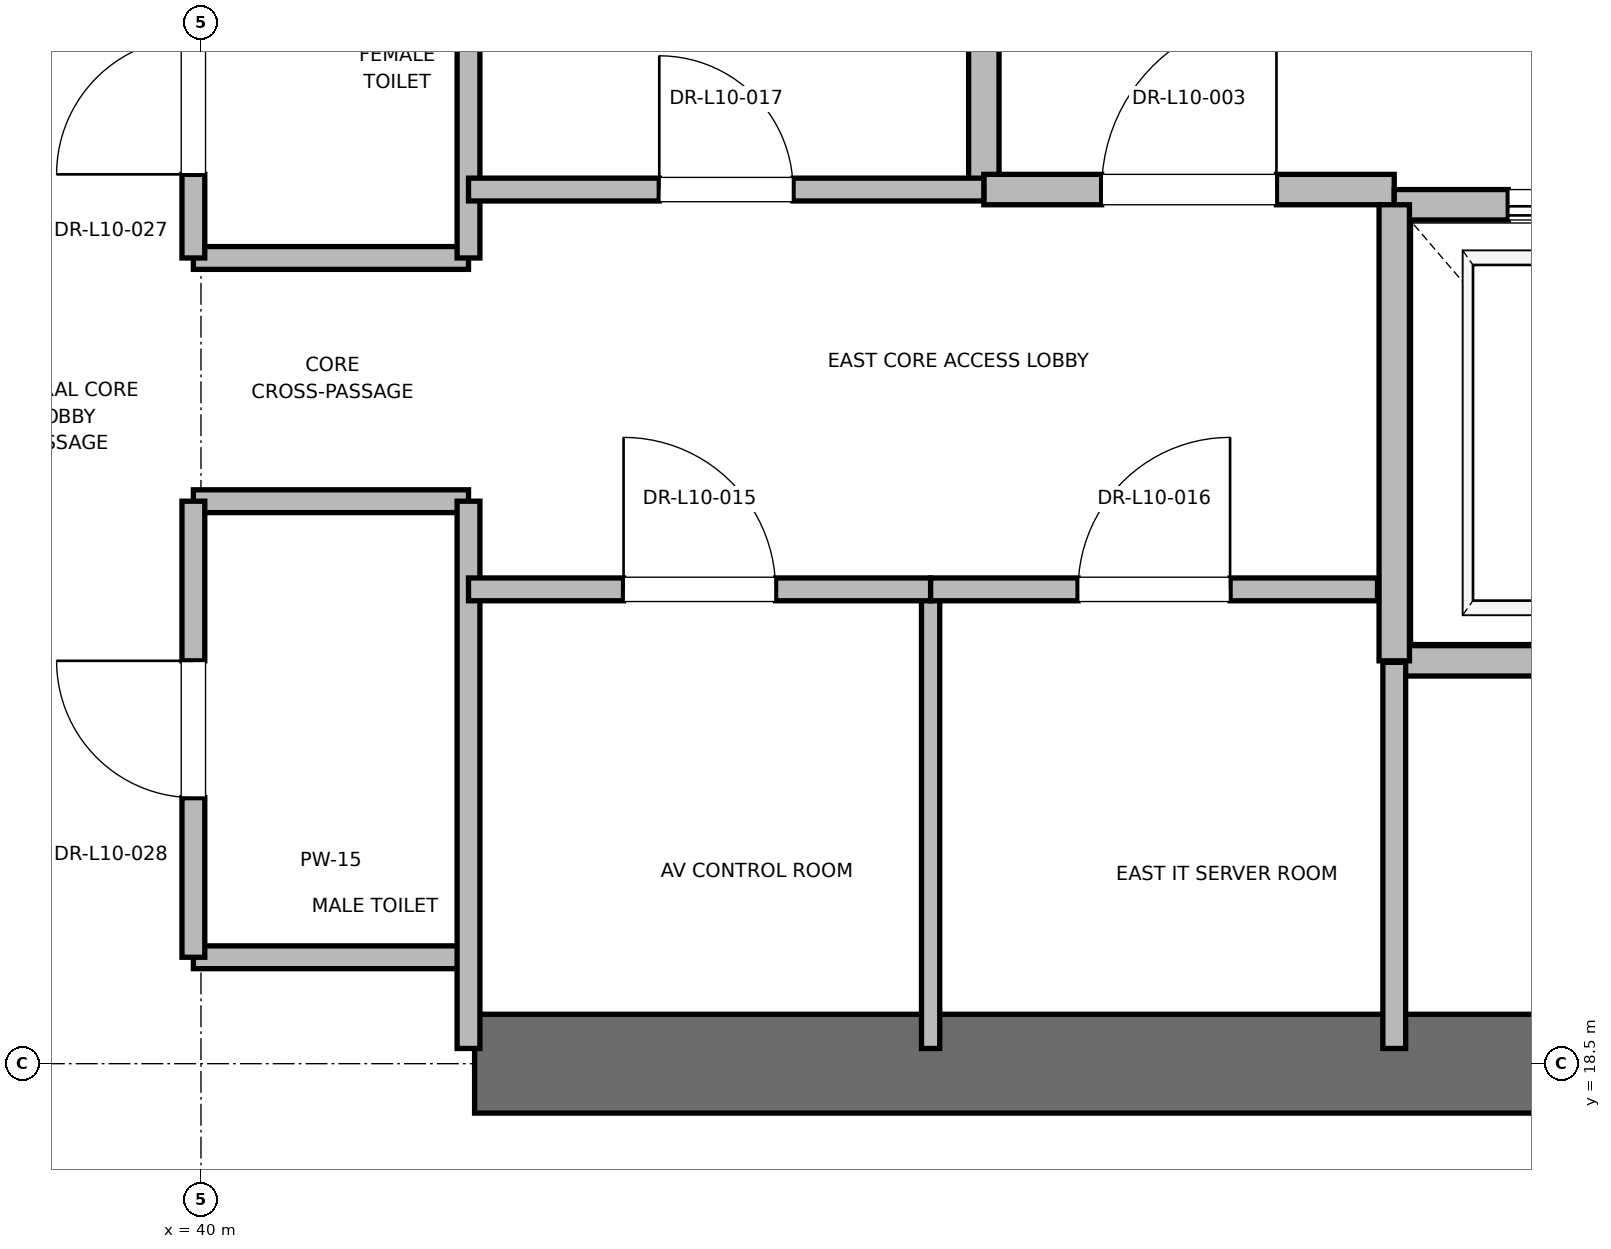
"""IFC4 building model, lengths in metres.
Left out: names, types, materials, properties, quantities, classifications, styles, units other than length and angle.
Written with IfcOpenShell. Run it as: python <this file> out.ifc"""

import sys

from ifc_helpers import new_model, si_unit, direction, frame, frame_2d, origin, place, context, subcontext, project, spatial, rectangle, extrude, element, fill, save


model = new_model("IFC4")
c1 = context("Model", 3, precision=1e-05, world=origin(), true_north=direction((0.0, 1.0)))
c2 = subcontext(c1, "Body", "Model", "MODEL_VIEW")
j1 = project(units=[si_unit("LENGTHUNIT", "METRE"), si_unit("PLANEANGLEUNIT", "RADIAN")], contexts=[c1])
p1 = place(None, origin())
s1 = spatial("IfcSite", under=j1, at=p1, CompositionType="ELEMENT")
p2 = place(p1, origin())
s2 = spatial("IfcBuilding", under=s1, at=p2, CompositionType="ELEMENT")
p3 = place(p2, frame((0.0, 0.0, 47.6)))
s3 = spatial("IfcBuildingStorey", under=s2, at=p3, CompositionType="ELEMENT", Elevation=47.6)
p4 = place(p3, frame((41.8, 18.5, 0.0), z_axis=(0.0, 0.0, 1.0), x_axis=(1.0, 0.0, 0.0)))
e1 = element("IfcWall", 1, at=p4, inside=s3, PredefinedType="SHEAR", context=c2, shape_type="SweptSolid", body=[
    extrude(rectangle(XDim=9.2, YDim=0.65, at=frame_2d((4.6, 0.0))), origin(), (0.0, 0.0, 1.0), 3.76),
])
p5 = place(p3, frame((45.15, 24.25, 0.0), z_axis=(0.0, 0.0, 1.0), x_axis=(0.0, 1.0, 0.0)))
e2 = element("IfcWall", 2, at=p5, inside=s3, PredefinedType="PARTITIONING", context=c2, shape_type="SweptSolid", body=[
    extrude(rectangle(XDim=3.37, YDim=0.2, at=frame_2d((1.685, 0.0))), origin(), (0.0, 0.0, 1.0), 3.76),
])
p6 = place(p3, frame((45.15, 24.25, 0.0), z_axis=(0.0, 0.0, 1.0), x_axis=(1.0, 0.0, 0.0)))
e3 = element("IfcWall", 3, at=p6, inside=s3, PredefinedType="PARTITIONING", context=c2, shape_type="SweptSolid", body=[
    extrude(rectangle(XDim=2.7, YDim=0.2, at=frame_2d((1.35, 0.0))), origin(), (0.0, 0.0, 1.0), 3.76),
])
p7 = place(p6, frame((0.775, 0.0, 0.0)))
e4 = element("IfcOpeningElement", 4, at=p7, cuts=e3, PredefinedType="OPENING", context=c2, shape_type="SweptSolid", body=[
    extrude(rectangle(XDim=1.15, YDim=2.2, at=frame_2d((0.575, 1.1))), frame((0.0, 0.1, 0.0), z_axis=(0.0, -1.0, 0.0), x_axis=(1.0, 0.0, 0.0)), (0.0, 0.0, 1.0), 0.2),
])
p8 = place(p3, frame((47.85, 21.15, 0.0), z_axis=(0.0, 0.0, 1.0), x_axis=(1.0, 0.0, 0.0)))
e5 = element("IfcWall", 5, at=p8, inside=s3, PredefinedType="SOLIDWALL", context=c2, shape_type="SweptSolid", body=[
    extrude(rectangle(XDim=2.6, YDim=0.2, at=frame_2d((1.3, 0.0))), origin(), (0.0, 0.0, 1.0), 3.76),
])
p9 = place(p3, frame((50.45, 24.15, 0.0), z_axis=(0.0, 0.0, 1.0), x_axis=(-1.0, 0.0, 0.0)))
e6 = element("IfcWall", 6, at=p9, inside=s3, PredefinedType="SOLIDWALL", context=c2, shape_type="SweptSolid", body=[
    extrude(rectangle(XDim=2.6, YDim=0.2, at=frame_2d((1.3, 0.0))), origin(), (0.0, 0.0, 1.0), 2.54),
])
p10 = place(p9, frame((0.75, 0.0, 0.0)))
e7 = element("IfcOpeningElement", 7, at=p10, cuts=e6, PredefinedType="OPENING", context=c2, shape_type="SweptSolid", body=[
    extrude(rectangle(XDim=1.1, YDim=2.2, at=frame_2d((0.55, 1.1))), frame((0.0, 0.1, 0.0), z_axis=(0.0, -1.0, 0.0), x_axis=(1.0, 0.0, 0.0)), (0.0, 0.0, 1.0), 0.2),
])
p11 = place(p3, frame((47.85, 24.15, 0.0), z_axis=(0.0, 0.0, 1.0), x_axis=(0.0, -1.0, 0.0)))
e8 = element("IfcWall", 8, at=p11, inside=s3, PredefinedType="SOLIDWALL", context=c2, shape_type="SweptSolid", body=[
    extrude(rectangle(XDim=3.0, YDim=0.2, at=frame_2d((1.5, 0.0))), origin(), (0.0, 0.0, 1.0), 3.76),
])
for number, where, z_axis, x_axis in (
    (9, (39.95, 19.2, 0.0), (0.0, 0.0, 1.0), (1.0, 0.0, 0.0)),
    (10, (39.95, 22.2, 0.0), (0.0, 0.0, 1.0), (1.0, 0.0, 0.0)),
    (11, (39.95, 23.8, 0.0), (0.0, 0.0, 1.0), (1.0, 0.0, 0.0)),
):
    element("IfcWall", number, at=place(p3, frame(where, z_axis=z_axis, x_axis=x_axis)), inside=s3, PredefinedType="PARTITIONING", context=c2, shape_type="SweptSolid", body=[
        extrude(rectangle(XDim=1.81, YDim=0.15, at=frame_2d((0.905, 0.0))), origin(), (0.0, 0.0, 1.0), 2.85),
    ])
p12 = place(p3, frame((41.76, 18.6, 0.0), z_axis=(0.0, 0.0, 1.0), x_axis=(0.0, 1.0, 0.0)))
e12 = element("IfcWall", 12, at=p12, inside=s3, PredefinedType="PARTITIONING", context=c2, shape_type="SweptSolid", body=[
    extrude(rectangle(XDim=3.6, YDim=0.15, at=frame_2d((1.8, 0.0))), origin(), (0.0, 0.0, 1.0), 2.54),
])
p13 = place(p3, frame((41.76, 23.8, 0.0), z_axis=(0.0, 0.0, 1.0), x_axis=(0.0, 1.0, 0.0)))
e13 = element("IfcWall", 13, at=p13, inside=s3, PredefinedType="PARTITIONING", context=c2, shape_type="SweptSolid", body=[
    extrude(rectangle(XDim=4.0, YDim=0.15, at=frame_2d((2.0, 0.0))), origin(), (0.0, 0.0, 1.0), 2.85),
])
p14 = place(p3, frame((39.95, 19.2, 0.0), z_axis=(0.0, 0.0, 1.0), x_axis=(0.0, 1.0, 0.0)))
e14 = element("IfcWall", 14, at=p14, inside=s3, PredefinedType="PARTITIONING", context=c2, shape_type="SweptSolid", body=[
    extrude(rectangle(XDim=3.0, YDim=0.15, at=frame_2d((1.5, 0.0))), origin(), (0.0, 0.0, 1.0), 2.85),
])
p15 = place(p14, frame((1.05, 0.0, 0.0)))
e15 = element("IfcOpeningElement", 15, at=p15, cuts=e14, PredefinedType="OPENING", context=c2, shape_type="SweptSolid", body=[
    extrude(rectangle(XDim=0.9, YDim=2.1, at=frame_2d((0.45, 1.05))), frame((0.0, 0.075, 0.0), z_axis=(0.0, -1.0, 0.0), x_axis=(1.0, 0.0, 0.0)), (0.0, 0.0, 1.0), 0.15),
])
p16 = place(p3, frame((39.95, 23.8, 0.0), z_axis=(0.0, 0.0, 1.0), x_axis=(0.0, 1.0, 0.0)))
e16 = element("IfcWall", 16, at=p16, inside=s3, PredefinedType="PARTITIONING", context=c2, shape_type="SweptSolid", body=[
    extrude(rectangle(XDim=2.0, YDim=0.15, at=frame_2d((1.0, 0.0))), origin(), (0.0, 0.0, 1.0), 2.85),
])
p17 = place(p16, frame((0.55, 0.0, 0.0)))
e17 = element("IfcOpeningElement", 17, at=p17, cuts=e16, PredefinedType="OPENING", context=c2, shape_type="SweptSolid", body=[
    extrude(rectangle(XDim=0.9, YDim=2.1, at=frame_2d((0.45, 1.05))), frame((0.0, 0.075, 0.0), z_axis=(0.0, -1.0, 0.0), x_axis=(1.0, 0.0, 0.0)), (0.0, 0.0, 1.0), 0.15),
])
p18 = place(p3, frame((47.85, 18.6, 0.0), z_axis=(0.0, 0.0, 1.0), x_axis=(0.0, 1.0, 0.0)))
e18 = element("IfcWall", 18, at=p18, inside=s3, PredefinedType="PARTITIONING", context=c2, shape_type="SweptSolid", body=[
    extrude(rectangle(XDim=2.54, YDim=0.15, at=frame_2d((1.27, 0.0))), origin(), (0.0, 0.0, 1.0), 2.85),
])
p19 = place(p3, frame((44.8, 18.6, 0.0), z_axis=(0.0, 0.0, 1.0), x_axis=(0.0, 1.0, 0.0)))
e19 = element("IfcWall", 19, at=p19, inside=s3, PredefinedType="PARTITIONING", context=c2, shape_type="SweptSolid", body=[
    extrude(rectangle(XDim=3.02, YDim=0.12, at=frame_2d((1.51, 0.0))), origin(), (0.0, 0.0, 1.0), 2.85),
])
p20 = place(p3, frame((41.76, 21.62, 0.0), z_axis=(0.0, 0.0, 1.0), x_axis=(1.0, 0.0, 0.0)))
e20 = element("IfcWall", 20, at=p20, inside=s3, PredefinedType="PARTITIONING", context=c2, shape_type="SweptSolid", body=[
    extrude(rectangle(XDim=3.04, YDim=0.15, at=frame_2d((1.52, 0.0))), origin(), (0.0, 0.0, 1.0), 2.85),
])
p21 = place(p20, frame((1.02, 0.0, 0.0)))
e21 = element("IfcOpeningElement", 21, at=p21, cuts=e20, PredefinedType="OPENING", context=c2, shape_type="SweptSolid", body=[
    extrude(rectangle(XDim=1.0, YDim=2.15, at=frame_2d((0.5, 1.075))), frame((0.0, 0.075, 0.0), z_axis=(0.0, -1.0, 0.0), x_axis=(1.0, 0.0, 0.0)), (0.0, 0.0, 1.0), 0.15),
])
p22 = place(p3, frame((44.8, 21.62, 0.0), z_axis=(0.0, 0.0, 1.0), x_axis=(1.0, 0.0, 0.0)))
e22 = element("IfcWall", 22, at=p22, inside=s3, PredefinedType="PARTITIONING", context=c2, shape_type="SweptSolid", body=[
    extrude(rectangle(XDim=2.94, YDim=0.15, at=frame_2d((1.47, 0.0))), origin(), (0.0, 0.0, 1.0), 2.85),
])
p23 = place(p22, frame((0.97, 0.0, 0.0)))
e23 = element("IfcOpeningElement", 23, at=p23, cuts=e22, PredefinedType="OPENING", context=c2, shape_type="SweptSolid", body=[
    extrude(rectangle(XDim=1.0, YDim=2.15, at=frame_2d((0.5, 1.075))), frame((0.0, 0.075, 0.0), z_axis=(0.0, -1.0, 0.0), x_axis=(1.0, 0.0, 0.0)), (0.0, 0.0, 1.0), 0.15),
])
p24 = place(p3, frame((41.76, 24.25, 0.0), z_axis=(0.0, 0.0, 1.0), x_axis=(1.0, 0.0, 0.0)))
e24 = element("IfcWall", 24, at=p24, inside=s3, PredefinedType="PARTITIONING", context=c2, shape_type="SweptSolid", body=[
    extrude(rectangle(XDim=3.39, YDim=0.15, at=frame_2d((1.695, 0.0))), origin(), (0.0, 0.0, 1.0), 2.85),
])
p25 = place(p24, frame((1.255, 0.0, 0.0)))
e25 = element("IfcOpeningElement", 25, at=p25, cuts=e24, PredefinedType="OPENING", context=c2, shape_type="SweptSolid", body=[
    extrude(rectangle(XDim=0.88, YDim=2.1, at=frame_2d((0.44, 1.05))), frame((0.0, 0.075, 0.0), z_axis=(0.0, -1.0, 0.0), x_axis=(1.0, 0.0, 0.0)), (0.0, 0.0, 1.0), 0.15),
])
p26 = place(p7, origin())
e26 = element("IfcDoor", 26, at=p26, inside=s3, OperationType="SINGLE_SWING_RIGHT", PredefinedType="DOOR", context=c2, shape_type="SweptSolid", body=[
    extrude(rectangle(XDim=1.15, YDim=2.2, at=frame_2d((0.575, 1.1))), frame((0.0, 0.025, 0.0), z_axis=(0.0, -1.0, 0.0), x_axis=(1.0, 0.0, 0.0)), (0.0, 0.0, 1.0), 0.05),
])
fill(e4, e26)
p27 = place(p10, origin())
e27 = element("IfcDoor", 27, at=p27, inside=s3, OperationType="SLIDING_TO_RIGHT", PredefinedType="DOOR", context=c2, shape_type="SweptSolid", body=[
    extrude(rectangle(XDim=1.1, YDim=2.2, at=frame_2d((0.55, 1.1))), frame((0.0, 0.025, 0.0), z_axis=(0.0, -1.0, 0.0), x_axis=(1.0, 0.0, 0.0)), (0.0, 0.0, 1.0), 0.05),
])
fill(e7, e27)
p28 = place(p15, origin())
e28 = element("IfcDoor", 28, at=p28, inside=s3, OperationType="SINGLE_SWING_RIGHT", PredefinedType="DOOR", context=c2, shape_type="SweptSolid", body=[
    extrude(rectangle(XDim=0.9, YDim=2.1, at=frame_2d((0.45, 1.05))), frame((0.0, 0.025, 0.0), z_axis=(0.0, -1.0, 0.0), x_axis=(1.0, 0.0, 0.0)), (0.0, 0.0, 1.0), 0.05),
])
fill(e15, e28)
p29 = place(p17, origin())
e29 = element("IfcDoor", 29, at=p29, inside=s3, OperationType="SINGLE_SWING_LEFT", PredefinedType="DOOR", context=c2, shape_type="SweptSolid", body=[
    extrude(rectangle(XDim=0.9, YDim=2.1, at=frame_2d((0.45, 1.05))), frame((0.0, 0.025, 0.0), z_axis=(0.0, -1.0, 0.0), x_axis=(1.0, 0.0, 0.0)), (0.0, 0.0, 1.0), 0.05),
])
fill(e17, e29)
p30 = place(p21, origin())
e30 = element("IfcDoor", 30, at=p30, inside=s3, OperationType="SINGLE_SWING_LEFT", PredefinedType="DOOR", context=c2, shape_type="SweptSolid", body=[
    extrude(rectangle(XDim=1.0, YDim=2.15, at=frame_2d((0.5, 1.075))), frame((0.0, 0.025, 0.0), z_axis=(0.0, -1.0, 0.0), x_axis=(1.0, 0.0, 0.0)), (0.0, 0.0, 1.0), 0.05),
])
fill(e21, e30)
p31 = place(p23, origin())
e31 = element("IfcDoor", 31, at=p31, inside=s3, OperationType="SINGLE_SWING_RIGHT", PredefinedType="DOOR", context=c2, shape_type="SweptSolid", body=[
    extrude(rectangle(XDim=1.0, YDim=2.15, at=frame_2d((0.5, 1.075))), frame((0.0, 0.025, 0.0), z_axis=(0.0, -1.0, 0.0), x_axis=(1.0, 0.0, 0.0)), (0.0, 0.0, 1.0), 0.05),
])
fill(e23, e31)
p32 = place(p25, origin())
e32 = element("IfcDoor", 32, at=p32, inside=s3, OperationType="SINGLE_SWING_LEFT", PredefinedType="DOOR", context=c2, shape_type="SweptSolid", body=[
    extrude(rectangle(XDim=0.88, YDim=2.1, at=frame_2d((0.44, 1.05))), frame((0.0, 0.025, 0.0), z_axis=(0.0, -1.0, 0.0), x_axis=(1.0, 0.0, 0.0)), (0.0, 0.0, 1.0), 0.05),
])
fill(e25, e32)
save(model, sys.argv[1])
